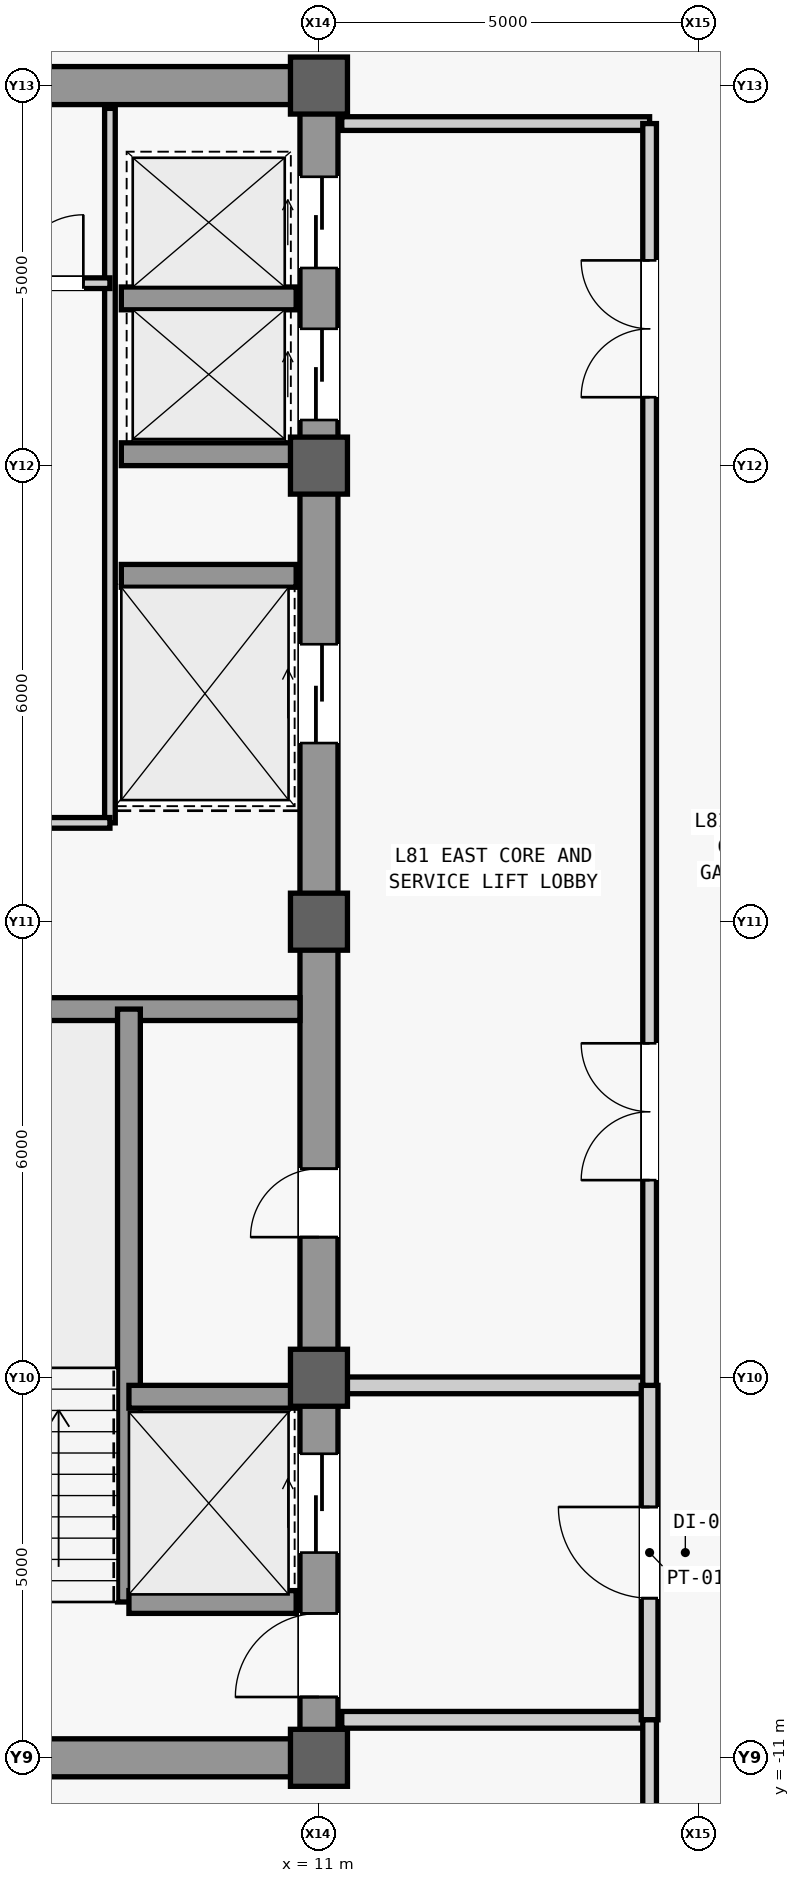
"""IFC4 building model, lengths in metres.
Left out: names, types, materials, properties, quantities, classifications, styles, units other than length and angle.
Written with IfcOpenShell. Run it as: python <this file> out.ifc"""

import sys

from ifc_helpers import new_model, si_unit, direction, frame, frame_2d, origin, origin_2d, place, context, subcontext, project, spatial, rectangle, extrude, source, transform, mapped, element, fill, save


model = new_model("IFC4")
c1 = context("Model", 3, precision=1e-05, world=origin(), true_north=direction((0.0, 1.0)))
c2 = subcontext(c1, "Body", "Model", "MODEL_VIEW")
j1 = project(units=[si_unit("LENGTHUNIT", "METRE"), si_unit("PLANEANGLEUNIT", "RADIAN")], contexts=[c1])
p1 = place(None, origin())
s1 = spatial("IfcSite", under=j1, at=p1, CompositionType="ELEMENT")
p2 = place(p1, origin())
s2 = spatial("IfcBuilding", under=s1, at=p2, CompositionType="ELEMENT")
p3 = place(p2, frame((0.0, 0.0, 342.3)))
s3 = spatial("IfcBuildingStorey", under=s2, at=p3, CompositionType="ELEMENT", Elevation=342.3)
m1 = source(origin(), c2, "Body", "SweptSolid", [
    extrude(rectangle(XDim=22.0, YDim=0.5, at=frame_2d((11.0, 0.0))), origin(), (0.0, 0.0, 1.0), 3.7),
])
p4 = place(p3, frame((11.0, -11.0, 0.0), z_axis=(0.0, 0.0, 1.0), x_axis=(0.0, 1.0, 0.0)))
e1 = element("IfcWall", 1, at=p4, inside=s3, PredefinedType="SHEAR", context=c2, shape_type="MappedRepresentation", body=[
    mapped(m1, transform((0.0, 0.0, 0.0), scale=1.0)),
])
m2 = source(origin(), c2, "Body", "SweptSolid", [
    extrude(rectangle(XDim=1.1, YDim=2.2, at=frame_2d((0.55, 1.1))), frame((0.0, 0.26, 0.0), z_axis=(0.0, -1.0, 0.0), x_axis=(1.0, 0.0, 0.0)), (0.0, 0.0, 1.0), 0.52),
])
p5 = place(p4, frame((0.8, 0.0, 0.0)))
e2 = element("IfcOpeningElement", 2, at=p5, cuts=e1, PredefinedType="OPENING", context=c2, shape_type="MappedRepresentation", body=[
    mapped(m2, transform((0.0, 0.0, 0.0), scale=1.0)),
])
m3 = source(origin(), c2, "Body", "SweptSolid", [
    extrude(rectangle(XDim=0.9, YDim=2.15, at=frame_2d((0.45, 1.075))), frame((0.0, 0.26, 0.0), z_axis=(0.0, -1.0, 0.0), x_axis=(1.0, 0.0, 0.0)), (0.0, 0.0, 1.0), 0.52),
])
p6 = place(p4, frame((6.85, 0.0, 0.0)))
e3 = element("IfcOpeningElement", 3, at=p6, cuts=e1, PredefinedType="OPENING", context=c2, shape_type="MappedRepresentation", body=[
    mapped(m3, transform((0.0, 0.0, 0.0), scale=1.0)),
])
m4 = source(origin(), c2, "Body", "SweptSolid", [
    extrude(rectangle(XDim=1.2, YDim=2.3, at=frame_2d((0.6, 1.15))), frame((0.0, 0.26, 0.0), z_axis=(0.0, -1.0, 0.0), x_axis=(1.0, 0.0, 0.0)), (0.0, 0.0, 1.0), 0.52),
])
p7 = place(p4, frame((17.6, 0.0, 0.0)))
e4 = element("IfcOpeningElement", 4, at=p7, cuts=e1, PredefinedType="OPENING", context=c2, shape_type="MappedRepresentation", body=[
    mapped(m4, transform((0.0, 0.0, 0.0), scale=1.0)),
])
p8 = place(p4, frame((19.6, 0.0, 0.0)))
e5 = element("IfcOpeningElement", 5, at=p8, cuts=e1, PredefinedType="OPENING", context=c2, shape_type="MappedRepresentation", body=[
    mapped(m4, transform((0.0, 0.0, 0.0), scale=1.0)),
])
m5 = source(origin(), c2, "Body", "SweptSolid", [
    extrude(rectangle(XDim=1.3, YDim=2.3, at=frame_2d((0.65, 1.15))), frame((0.0, 0.26, 0.0), z_axis=(0.0, -1.0, 0.0), x_axis=(1.0, 0.0, 0.0)), (0.0, 0.0, 1.0), 0.52),
])
p9 = place(p4, frame((2.7, 0.0, 0.0)))
e6 = element("IfcOpeningElement", 6, at=p9, cuts=e1, PredefinedType="OPENING", context=c2, shape_type="MappedRepresentation", body=[
    mapped(m5, transform((0.0, 0.0, 0.0), scale=1.0)),
])
p10 = place(p4, frame((13.35, 0.0, 0.0)))
e7 = element("IfcOpeningElement", 7, at=p10, cuts=e1, PredefinedType="OPENING", context=c2, shape_type="MappedRepresentation", body=[
    mapped(m5, transform((0.0, 0.0, 0.0), scale=1.0)),
])
m6 = source(origin(), c2, "Body", "SweptSolid", [
    extrude(rectangle(XDim=5.9, YDim=0.5, at=frame_2d((2.95, 0.0))), origin(), (0.0, 0.0, 1.0), 3.7),
])
p11 = place(p3, frame((4.85, -11.0, 0.0), z_axis=(0.0, 0.0, 1.0), x_axis=(1.0, 0.0, 0.0)))
e8 = element("IfcWall", 8, at=p11, inside=s3, PredefinedType="SHEAR", context=c2, shape_type="MappedRepresentation", body=[
    mapped(m6, transform((0.0, 0.0, 0.0), scale=1.0)),
])
p12 = place(p3, frame((4.85, 11.0, 0.0), z_axis=(0.0, 0.0, 1.0), x_axis=(1.0, 0.0, 0.0)))
e9 = element("IfcWall", 9, at=p12, inside=s3, PredefinedType="SHEAR", context=c2, shape_type="MappedRepresentation", body=[
    mapped(m6, transform((0.0, 0.0, 0.0), scale=1.0)),
])
m7 = source(origin(), c2, "Body", "SweptSolid", [
    extrude(rectangle(XDim=1.05, YDim=2.2, at=frame_2d((0.525, 1.1))), frame((0.0, 0.26, 0.0), z_axis=(0.0, -1.0, 0.0), x_axis=(1.0, 0.0, 0.0)), (0.0, 0.0, 1.0), 0.52),
])
p13 = place(p12, frame((1.375, 0.0, 0.0)))
e10 = element("IfcOpeningElement", 10, at=p13, cuts=e9, PredefinedType="OPENING", context=c2, shape_type="MappedRepresentation", body=[
    mapped(m7, transform((0.0, 0.0, 0.0), scale=1.0)),
])
m8 = source(origin(), c2, "Body", "SweptSolid", [
    extrude(rectangle(XDim=5.65, YDim=0.3, at=frame_2d((2.825, 0.0))), origin(), (0.0, 0.0, 1.0), 3.7),
])
p14 = place(p3, frame((5.1, -1.15, 0.0), z_axis=(0.0, 0.0, 1.0), x_axis=(1.0, 0.0, 0.0)))
e11 = element("IfcWall", 11, at=p14, inside=s3, PredefinedType="SHEAR", context=c2, shape_type="MappedRepresentation", body=[
    mapped(m8, transform((0.0, 0.0, 0.0), scale=1.0)),
])
m9 = source(origin(), c2, "Body", "SweptSolid", [
    extrude(rectangle(XDim=0.75, YDim=0.75, at=origin_2d()), origin(), (0.0, 0.0, 1.0), 4.0),
])
for number, where, z_axis, x_axis in (
    (12, (11.0, -11.0, 0.0), (0.0, 0.0, 1.0), (1.0, 0.0, 0.0)),
    (13, (11.0, -6.0, 0.0), (0.0, 0.0, 1.0), (1.0, 0.0, 0.0)),
    (14, (11.0, 0.0, 0.0), (0.0, 0.0, 1.0), (1.0, 0.0, 0.0)),
    (15, (11.0, 6.0, 0.0), (0.0, 0.0, 1.0), (1.0, 0.0, 0.0)),
    (16, (11.0, 11.0, 0.0), (0.0, 0.0, 1.0), (1.0, 0.0, 0.0)),
):
    element("IfcColumn", number, at=place(p3, frame(where, z_axis=z_axis, x_axis=x_axis)), inside=s3, PredefinedType="COLUMN", context=c2, shape_type="MappedRepresentation", body=[
        mapped(m9, transform((0.0, 0.0, 0.0), scale=1.0)),
    ])
m10 = source(origin(), c2, "Body", "SweptSolid", [
    extrude(rectangle(XDim=7.8, YDim=0.3, at=frame_2d((3.9, 0.0))), origin(), (0.0, 0.0, 1.0), 3.7),
])
p15 = place(p3, frame((8.5, -8.95, 0.0), z_axis=(0.0, 0.0, 1.0), x_axis=(0.0, 1.0, 0.0)))
e17 = element("IfcWall", 17, at=p15, inside=s3, PredefinedType="SHEAR", context=c2, shape_type="MappedRepresentation", body=[
    mapped(m10, transform((0.0, 0.0, 0.0), scale=1.0)),
])
m11 = source(origin(), c2, "Body", "SweptSolid", [
    extrude(rectangle(XDim=2.2, YDim=0.3, at=frame_2d((1.1, 0.0))), origin(), (0.0, 0.0, 1.0), 3.7),
])
for number, where, z_axis, x_axis in (
    (18, (8.5, -8.95, 0.0), (0.0, 0.0, 1.0), (1.0, 0.0, 0.0)),
    (19, (8.5, -6.25, 0.0), (0.0, 0.0, 1.0), (1.0, 0.0, 0.0)),
):
    element("IfcWall", number, at=place(p3, frame(where, z_axis=z_axis, x_axis=x_axis)), inside=s3, PredefinedType="SHEAR", context=c2, shape_type="MappedRepresentation", body=[
        mapped(m11, transform((0.0, 0.0, 0.0), scale=1.0)),
    ])
m12 = source(origin(), c2, "Body", "SweptSolid", [
    extrude(rectangle(XDim=2.3, YDim=0.3, at=frame_2d((1.15, 0.0))), origin(), (0.0, 0.0, 1.0), 3.7),
])
for number, where, z_axis, x_axis in (
    (20, (8.4, 4.55, 0.0), (0.0, 0.0, 1.0), (1.0, 0.0, 0.0)),
    (21, (8.4, 6.15, 0.0), (0.0, 0.0, 1.0), (1.0, 0.0, 0.0)),
    (22, (8.4, 8.2, 0.0), (0.0, 0.0, 1.0), (1.0, 0.0, 0.0)),
):
    element("IfcWall", number, at=place(p3, frame(where, z_axis=z_axis, x_axis=x_axis)), inside=s3, PredefinedType="SHEAR", context=c2, shape_type="MappedRepresentation", body=[
        mapped(m12, transform((0.0, 0.0, 0.0), scale=1.0)),
    ])
m13 = source(origin(), c2, "Body", "SweptSolid", [
    extrude(rectangle(XDim=9.4, YDim=0.14, at=frame_2d((4.7, 0.0))), origin(), (0.0, 0.0, 1.0), 3.7),
])
p16 = place(p3, frame((8.25, 1.3, 0.0), z_axis=(0.0, 0.0, 1.0), x_axis=(0.0, 1.0, 0.0)))
e23 = element("IfcWall", 23, at=p16, inside=s3, PredefinedType="PARTITIONING", context=c2, shape_type="MappedRepresentation", body=[
    mapped(m13, transform((0.0, 0.0, 0.0), scale=1.0)),
])
m14 = source(origin(), c2, "Body", "SweptSolid", [
    extrude(rectangle(XDim=3.15, YDim=0.14, at=frame_2d((1.575, 0.0))), origin(), (0.0, 0.0, 1.0), 3.7),
])
p17 = place(p3, frame((5.1, 1.3, 0.0), z_axis=(0.0, 0.0, 1.0), x_axis=(1.0, 0.0, 0.0)))
e24 = element("IfcWall", 24, at=p17, inside=s3, PredefinedType="PARTITIONING", context=c2, shape_type="MappedRepresentation", body=[
    mapped(m14, transform((0.0, 0.0, 0.0), scale=1.0)),
])
p18 = place(p3, frame((5.1, 8.4, 0.0), z_axis=(0.0, 0.0, 1.0), x_axis=(1.0, 0.0, 0.0)))
e25 = element("IfcWall", 25, at=p18, inside=s3, PredefinedType="PARTITIONING", context=c2, shape_type="MappedRepresentation", body=[
    mapped(m14, transform((0.0, 0.0, 0.0), scale=1.0)),
])
m15 = source(origin(), c2, "Body", "SweptSolid", [
    extrude(rectangle(XDim=0.9, YDim=2.15, at=frame_2d((0.45, 1.075))), frame((0.0, 0.08, 0.0), z_axis=(0.0, -1.0, 0.0), x_axis=(1.0, 0.0, 0.0)), (0.0, 0.0, 1.0), 0.16),
])
p19 = place(p18, frame((0.33, 0.0, 0.0)))
e26 = element("IfcOpeningElement", 26, at=p19, cuts=e25, PredefinedType="OPENING", context=c2, shape_type="MappedRepresentation", body=[
    mapped(m15, transform((0.0, 0.0, 0.0), scale=1.0)),
])
p20 = place(p18, frame((1.9, 0.0, 0.0)))
e27 = element("IfcOpeningElement", 27, at=p20, cuts=e25, PredefinedType="OPENING", context=c2, shape_type="MappedRepresentation", body=[
    mapped(m15, transform((0.0, 0.0, 0.0), scale=1.0)),
])
m16 = source(origin(), c2, "Body", "SweptSolid", [
    extrude(rectangle(XDim=4.05, YDim=0.22, at=frame_2d((2.025, 0.0))), origin(), (0.0, 0.0, 1.0), 3.7),
])
p21 = place(p3, frame((11.3, -10.5, 0.0), z_axis=(0.0, 0.0, 1.0), x_axis=(1.0, 0.0, 0.0)))
e28 = element("IfcWall", 28, at=p21, inside=s3, PredefinedType="PARTITIONING", context=c2, shape_type="MappedRepresentation", body=[
    mapped(m16, transform((0.0, 0.0, 0.0), scale=1.0)),
])
m17 = source(origin(), c2, "Body", "SweptSolid", [
    extrude(rectangle(XDim=4.05, YDim=0.22, at=frame_2d((2.025, 0.0))), origin(), (0.0, 0.0, 1.0), 3.084),
])
p22 = place(p3, frame((11.3, -6.1, 0.0), z_axis=(0.0, 0.0, 1.0), x_axis=(1.0, 0.0, 0.0)))
e29 = element("IfcWall", 29, at=p22, inside=s3, PredefinedType="PARTITIONING", context=c2, shape_type="MappedRepresentation", body=[
    mapped(m17, transform((0.0, 0.0, 0.0), scale=1.0)),
])
m18 = source(origin(), c2, "Body", "SweptSolid", [
    extrude(rectangle(XDim=4.4, YDim=0.22, at=frame_2d((2.2, 0.0))), origin(), (0.0, 0.0, 1.0), 3.7),
])
p23 = place(p3, frame((15.35, -10.5, 0.0), z_axis=(0.0, 0.0, 1.0), x_axis=(0.0, 1.0, 0.0)))
e30 = element("IfcWall", 30, at=p23, inside=s3, PredefinedType="PARTITIONING", context=c2, shape_type="MappedRepresentation", body=[
    mapped(m18, transform((0.0, 0.0, 0.0), scale=1.0)),
])
m19 = source(origin(), c2, "Body", "SweptSolid", [
    extrude(rectangle(XDim=1.2, YDim=2.2, at=frame_2d((0.6, 1.1))), frame((0.0, 0.12, 0.0), z_axis=(0.0, -1.0, 0.0), x_axis=(1.0, 0.0, 0.0)), (0.0, 0.0, 1.0), 0.24),
])
p24 = place(p23, frame((1.6, 0.0, 0.0)))
e31 = element("IfcOpeningElement", 31, at=p24, cuts=e30, PredefinedType="OPENING", context=c2, shape_type="MappedRepresentation", body=[
    mapped(m19, transform((0.0, 0.0, 0.0), scale=1.0)),
])
m20 = source(origin(), c2, "Body", "SweptSolid", [
    extrude(rectangle(XDim=4.05, YDim=0.18, at=frame_2d((2.025, 0.0))), origin(), (0.0, 0.0, 1.0), 3.7),
])
p25 = place(p3, frame((11.3, 10.5, 0.0), z_axis=(0.0, 0.0, 1.0), x_axis=(1.0, 0.0, 0.0)))
e32 = element("IfcWall", 32, at=p25, inside=s3, PredefinedType="PARTITIONING", context=c2, shape_type="MappedRepresentation", body=[
    mapped(m20, transform((0.0, 0.0, 0.0), scale=1.0)),
])
m21 = source(origin(), c2, "Body", "SweptSolid", [
    extrude(rectangle(XDim=16.6, YDim=0.18, at=frame_2d((8.3, 0.0))), origin(), (0.0, 0.0, 1.0), 3.7),
])
p26 = place(p3, frame((15.35, -6.1, 0.0), z_axis=(0.0, 0.0, 1.0), x_axis=(0.0, 1.0, 0.0)))
e33 = element("IfcWall", 33, at=p26, inside=s3, PredefinedType="PARTITIONING", context=c2, shape_type="MappedRepresentation", body=[
    mapped(m21, transform((0.0, 0.0, 0.0), scale=1.0)),
])
m22 = source(origin(), c2, "Body", "SweptSolid", [
    extrude(rectangle(XDim=1.8, YDim=2.25, at=frame_2d((0.9, 1.125))), frame((0.0, 0.1, 0.0), z_axis=(0.0, -1.0, 0.0), x_axis=(1.0, 0.0, 0.0)), (0.0, 0.0, 1.0), 0.2),
])
p27 = place(p26, frame((2.7, 0.0, 0.0)))
e34 = element("IfcOpeningElement", 34, at=p27, cuts=e33, PredefinedType="OPENING", context=c2, shape_type="MappedRepresentation", body=[
    mapped(m22, transform((0.0, 0.0, 0.0), scale=1.0)),
])
p28 = place(p26, frame((13.0, 0.0, 0.0)))
e35 = element("IfcOpeningElement", 35, at=p28, cuts=e33, PredefinedType="OPENING", context=c2, shape_type="MappedRepresentation", body=[
    mapped(m22, transform((0.0, 0.0, 0.0), scale=1.0)),
])
m23 = source(origin(), c2, "Body", "SweptSolid", [
    extrude(rectangle(XDim=4.4, YDim=0.18, at=frame_2d((2.2, 0.0))), origin(), (0.0, 0.0, 1.0), 3.7),
])
p29 = place(p3, frame((15.35, -14.9, 0.0), z_axis=(0.0, 0.0, 1.0), x_axis=(0.0, 1.0, 0.0)))
e36 = element("IfcWall", 36, at=p29, inside=s3, PredefinedType="PARTITIONING", context=c2, shape_type="MappedRepresentation", body=[
    mapped(m23, transform((0.0, 0.0, 0.0), scale=1.0)),
])
m24 = source(origin(), c2, "Body", "SweptSolid", [
    extrude(rectangle(XDim=1.1, YDim=2.2, at=frame_2d((0.55, 1.1))), frame((0.0, 0.025, 0.0), z_axis=(0.0, -1.0, 0.0), x_axis=(1.0, 0.0, 0.0)), (0.0, 0.0, 1.0), 0.05),
])
p30 = place(p5, origin())
e37 = element("IfcDoor", 37, at=p30, inside=s3, OperationType="SINGLE_SWING_LEFT", PredefinedType="DOOR", context=c2, shape_type="MappedRepresentation", body=[
    mapped(m24, transform((0.0, 0.0, 0.0), scale=1.0)),
])
fill(e2, e37)
m25 = source(origin(), c2, "Body", "SweptSolid", [
    extrude(rectangle(XDim=0.9, YDim=2.15, at=frame_2d((0.45, 1.075))), frame((0.0, 0.025, 0.0), z_axis=(0.0, -1.0, 0.0), x_axis=(1.0, 0.0, 0.0)), (0.0, 0.0, 1.0), 0.05),
])
p31 = place(p6, origin())
e38 = element("IfcDoor", 38, at=p31, inside=s3, OperationType="SINGLE_SWING_LEFT", PredefinedType="DOOR", context=c2, shape_type="MappedRepresentation", body=[
    mapped(m25, transform((0.0, 0.0, 0.0), scale=1.0)),
])
fill(e3, e38)
p32 = place(p20, origin())
e39 = element("IfcDoor", 39, at=p32, inside=s3, OperationType="SINGLE_SWING_RIGHT", PredefinedType="DOOR", context=c2, shape_type="MappedRepresentation", body=[
    mapped(m25, transform((0.0, 0.0, 0.0), scale=1.0)),
])
fill(e27, e39)
m26 = source(origin(), c2, "Body", "SweptSolid", [
    extrude(rectangle(XDim=1.2, YDim=2.2, at=frame_2d((0.6, 1.1))), frame((0.0, 0.025, 0.0), z_axis=(0.0, -1.0, 0.0), x_axis=(1.0, 0.0, 0.0)), (0.0, 0.0, 1.0), 0.05),
])
p33 = place(p24, origin())
e40 = element("IfcDoor", 40, at=p33, inside=s3, OperationType="SINGLE_SWING_RIGHT", PredefinedType="DOOR", context=c2, shape_type="MappedRepresentation", body=[
    mapped(m26, transform((0.0, 0.0, 0.0), scale=1.0)),
])
fill(e31, e40)
m27 = source(origin(), c2, "Body", "SweptSolid", [
    extrude(rectangle(XDim=1.8, YDim=2.25, at=frame_2d((0.9, 1.125))), frame((0.0, 0.025, 0.0), z_axis=(0.0, -1.0, 0.0), x_axis=(1.0, 0.0, 0.0)), (0.0, 0.0, 1.0), 0.05),
])
p34 = place(p27, origin())
e41 = element("IfcDoor", 41, at=p34, inside=s3, OperationType="SINGLE_SWING_RIGHT", PredefinedType="DOOR", context=c2, shape_type="MappedRepresentation", body=[
    mapped(m27, transform((0.0, 0.0, 0.0), scale=1.0)),
])
fill(e34, e41)
p35 = place(p28, origin())
e42 = element("IfcDoor", 42, at=p35, inside=s3, OperationType="SINGLE_SWING_LEFT", PredefinedType="DOOR", context=c2, shape_type="MappedRepresentation", body=[
    mapped(m27, transform((0.0, 0.0, 0.0), scale=1.0)),
])
fill(e35, e42)
m28 = source(origin(), c2, "Body", "SweptSolid", [
    extrude(rectangle(XDim=1.2, YDim=2.3, at=frame_2d((0.6, 1.15))), frame((0.0, 0.025, 0.0), z_axis=(0.0, -1.0, 0.0), x_axis=(1.0, 0.0, 0.0)), (0.0, 0.0, 1.0), 0.05),
])
p36 = place(p7, origin())
e43 = element("IfcDoor", 43, at=p36, inside=s3, OperationType="SLIDING_TO_LEFT", PredefinedType="DOOR", context=c2, shape_type="MappedRepresentation", body=[
    mapped(m28, transform((0.0, 0.0, 0.0), scale=1.0)),
])
fill(e4, e43)
p37 = place(p8, origin())
e44 = element("IfcDoor", 44, at=p37, inside=s3, OperationType="SLIDING_TO_LEFT", PredefinedType="DOOR", context=c2, shape_type="MappedRepresentation", body=[
    mapped(m28, transform((0.0, 0.0, 0.0), scale=1.0)),
])
fill(e5, e44)
m29 = source(origin(), c2, "Body", "SweptSolid", [
    extrude(rectangle(XDim=1.3, YDim=2.3, at=frame_2d((0.65, 1.15))), frame((0.0, 0.025, 0.0), z_axis=(0.0, -1.0, 0.0), x_axis=(1.0, 0.0, 0.0)), (0.0, 0.0, 1.0), 0.05),
])
p38 = place(p9, origin())
e45 = element("IfcDoor", 45, at=p38, inside=s3, OperationType="SLIDING_TO_LEFT", PredefinedType="DOOR", context=c2, shape_type="MappedRepresentation", body=[
    mapped(m29, transform((0.0, 0.0, 0.0), scale=1.0)),
])
fill(e6, e45)
p39 = place(p10, origin())
e46 = element("IfcDoor", 46, at=p39, inside=s3, OperationType="SLIDING_TO_LEFT", PredefinedType="DOOR", context=c2, shape_type="MappedRepresentation", body=[
    mapped(m29, transform((0.0, 0.0, 0.0), scale=1.0)),
])
fill(e7, e46)
save(model, sys.argv[1])
